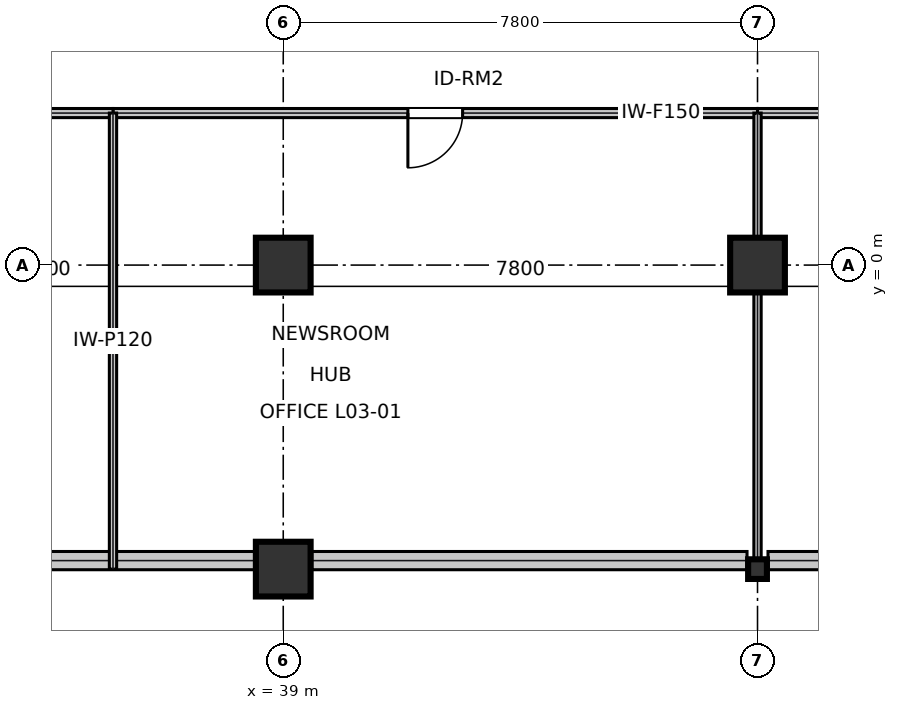
"""IFC4 building model, lengths in metres.
Left out: names, types, materials, properties, quantities, classifications, styles, units other than length and angle.
Written with IfcOpenShell. Run it as: python <this file> out.ifc"""

import sys

from ifc_helpers import new_model, si_unit, direction, frame, frame_2d, origin, origin_2d, place, context, subcontext, project, spatial, rectangle, i_section, extrude, element, fill, save


model = new_model("IFC4")
c1 = context("Model", 3, precision=1e-05, world=origin(), true_north=direction((0.0, 1.0)))
c2 = subcontext(c1, "Body", "Model", "MODEL_VIEW")
j1 = project(units=[si_unit("LENGTHUNIT", "METRE"), si_unit("PLANEANGLEUNIT", "RADIAN")], contexts=[c1])
p1 = place(None, origin())
s1 = spatial("IfcSite", under=j1, at=p1, CompositionType="ELEMENT")
p2 = place(p1, origin())
s2 = spatial("IfcBuilding", under=s1, at=p2, CompositionType="ELEMENT")
p3 = place(p2, frame((0.0, 0.0, 16.2)))
s3 = spatial("IfcBuildingStorey", under=s2, at=p3, CompositionType="ELEMENT", Elevation=16.2)
for number, where, z_axis, x_axis in (
    (1, (39.0, -5.0, 0.0), (0.0, 0.0, 1.0), (1.0, 0.0, 0.0)),
    (2, (39.0, 0.0, 0.0), (0.0, 0.0, 1.0), (1.0, 0.0, 0.0)),
):
    element("IfcColumn", number, at=place(p3, frame(where, z_axis=z_axis, x_axis=x_axis)), inside=s3, PredefinedType="COLUMN", context=c2, shape_type="SweptSolid", body=[
        extrude(rectangle(XDim=0.9, YDim=0.9, at=origin_2d()), origin(), (0.0, 0.0, 1.0), 5.395),
    ])
p4 = place(p3, frame((46.8, -5.0, 0.0), z_axis=(0.0, 0.0, 1.0), x_axis=(1.0, 0.0, 0.0)))
e3 = element("IfcColumn", 3, at=p4, inside=s3, PredefinedType="COLUMN", context=c2, shape_type="SweptSolid", body=[
    extrude(i_section(OverallWidth=0.309, OverallDepth=0.323, WebThickness=0.013, FlangeThickness=0.023, at=origin_2d()), origin(), (0.0, 0.0, 1.0), 5.395),
])
p5 = place(p3, frame((46.8, 0.0, 0.0), z_axis=(0.0, 0.0, 1.0), x_axis=(1.0, 0.0, 0.0)))
e4 = element("IfcColumn", 4, at=p5, inside=s3, PredefinedType="COLUMN", context=c2, shape_type="SweptSolid", body=[
    extrude(rectangle(XDim=0.9, YDim=0.9, at=origin_2d()), origin(), (0.0, 0.0, 1.0), 5.395),
])
p6 = place(p3, frame((31.668, -4.86, 0.0), z_axis=(0.0, 0.0, 1.0), x_axis=(1.0, 0.0, 0.0)))
e5 = element("IfcWall", 5, at=p6, inside=s3, PredefinedType="STANDARD", context=c2, shape_type="SweptSolid", body=[
    extrude(rectangle(XDim=6.864, YDim=0.3, at=frame_2d((3.432, 0.0))), origin(), (0.0, 0.0, 1.0), 4.648),
])
p7 = place(p3, frame((39.468, -4.86, 0.0), z_axis=(0.0, 0.0, 1.0), x_axis=(1.0, 0.0, 0.0)))
e6 = element("IfcWall", 6, at=p7, inside=s3, PredefinedType="STANDARD", context=c2, shape_type="SweptSolid", body=[
    extrude(rectangle(XDim=7.159, YDim=0.3, at=frame_2d((3.58, 0.0))), origin(), (0.0, 0.0, 1.0), 4.648),
])
p8 = place(p3, frame((46.972, -4.86, 0.0), z_axis=(0.0, 0.0, 1.0), x_axis=(1.0, 0.0, 0.0)))
e7 = element("IfcWall", 7, at=p8, inside=s3, PredefinedType="STANDARD", context=c2, shape_type="SweptSolid", body=[
    extrude(rectangle(XDim=7.16, YDim=0.3, at=frame_2d((3.58, 0.0))), origin(), (0.0, 0.0, 1.0), 4.648),
])
p9 = place(p3, frame((36.2, 2.5, 0.0), z_axis=(0.0, 0.0, 1.0), x_axis=(1.0, 0.0, 0.0)))
e8 = element("IfcWall", 8, at=p9, inside=s3, PredefinedType="PARTITIONING", context=c2, shape_type="SweptSolid", body=[
    extrude(rectangle(XDim=10.6, YDim=0.15, at=frame_2d((5.3, 0.0))), origin(), (0.0, 0.0, 1.0), 4.415),
])
p10 = place(p9, frame((4.85, 0.0, 0.0)))
e9 = element("IfcOpeningElement", 9, at=p10, cuts=e8, PredefinedType="OPENING", context=c2, shape_type="SweptSolid", body=[
    extrude(rectangle(XDim=0.9, YDim=2.15, at=frame_2d((0.45, 1.075))), frame((0.0, 0.085, 0.0), z_axis=(0.0, -1.0, 0.0), x_axis=(1.0, 0.0, 0.0)), (0.0, 0.0, 1.0), 0.17),
])
p11 = place(p3, frame((26.2, 2.5, 0.0), z_axis=(0.0, 0.0, 1.0), x_axis=(1.0, 0.0, 0.0)))
e10 = element("IfcWall", 10, at=p11, inside=s3, PredefinedType="PARTITIONING", context=c2, shape_type="SweptSolid", body=[
    extrude(rectangle(XDim=10.0, YDim=0.15, at=frame_2d((5.0, 0.0))), origin(), (0.0, 0.0, 1.0), 4.415),
])
p12 = place(p3, frame((46.8, 2.5, 0.0), z_axis=(0.0, 0.0, 1.0), x_axis=(1.0, 0.0, 0.0)))
e11 = element("IfcWall", 11, at=p12, inside=s3, PredefinedType="PARTITIONING", context=c2, shape_type="SweptSolid", body=[
    extrude(rectangle(XDim=5.7, YDim=0.15, at=frame_2d((2.85, 0.0))), origin(), (0.0, 0.0, 1.0), 4.415),
])
for number, where, z_axis, x_axis in (
    (12, (36.2, -5.0, 0.0), (0.0, 0.0, 1.0), (0.0, 1.0, 0.0)),
    (13, (46.8, -5.0, 0.0), (0.0, 0.0, 1.0), (0.0, 1.0, 0.0)),
):
    element("IfcWall", number, at=place(p3, frame(where, z_axis=z_axis, x_axis=x_axis)), inside=s3, PredefinedType="PARTITIONING", context=c2, shape_type="SweptSolid", body=[
        extrude(rectangle(XDim=7.5, YDim=0.12, at=frame_2d((3.75, 0.0))), origin(), (0.0, 0.0, 1.0), 4.338),
    ])
p13 = place(p10, frame((0.9, 0.0, 0.0), z_axis=(0.0, 0.0, 1.0), x_axis=(-1.0, 0.0, 0.0)))
e14 = element("IfcDoor", 14, at=p13, inside=s3, OperationType="SINGLE_SWING_RIGHT", PredefinedType="DOOR", context=c2, shape_type="SweptSolid", body=[
    extrude(rectangle(XDim=0.9, YDim=2.15, at=frame_2d((0.45, 1.075))), frame((0.0, 0.025, 0.0), z_axis=(0.0, -1.0, 0.0), x_axis=(1.0, 0.0, 0.0)), (0.0, 0.0, 1.0), 0.05),
])
fill(e9, e14)
save(model, sys.argv[1])
